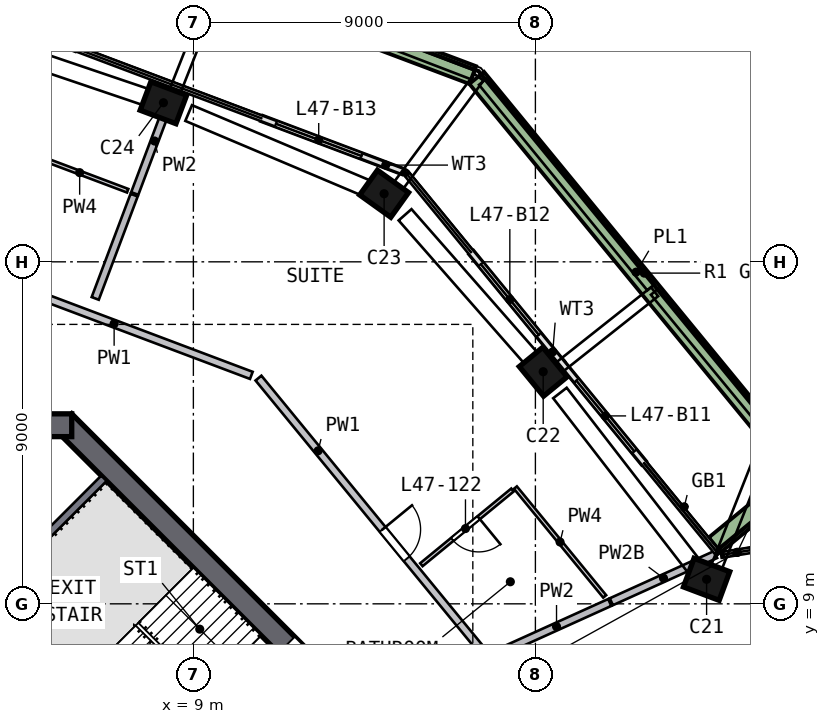
"""IFC4 building model, lengths in metres.
Left out: names, types, materials, properties, quantities, classifications, styles, units other than length and angle.
Written with IfcOpenShell. Run it as: python <this file> out.ifc"""

import sys

from ifc_helpers import new_model, si_unit, direction, frame, frame_2d, origin, origin_2d, place, context, subcontext, project, spatial, rectangle, extrude, element, fill, save


model = new_model("IFC4")
c1 = context("Model", 3, precision=1e-05, world=origin(), true_north=direction((0.0, 1.0)))
c2 = subcontext(c1, "Body", "Model", "MODEL_VIEW")
j1 = project(units=[si_unit("LENGTHUNIT", "METRE"), si_unit("PLANEANGLEUNIT", "RADIAN")], contexts=[c1])
p1 = place(None, origin())
s1 = spatial("IfcSite", under=j1, at=p1, CompositionType="ELEMENT")
p2 = place(p1, origin())
s2 = spatial("IfcBuilding", under=s1, at=p2, CompositionType="ELEMENT")
p3 = place(p2, frame((0.0, 0.0, 194.0)))
s3 = spatial("IfcBuildingStorey", under=s2, at=p3, CompositionType="ELEMENT", Elevation=194.0)
p4 = place(p3, frame((22.561, 9.516, 0.0), z_axis=(-0.046140603, 0.106875927, 0.993201179), x_axis=(0.935152586, -0.344962339, 0.080564417)))
e1 = element("IfcColumn", 1, at=p4, inside=s3, PredefinedType="COLUMN", context=c2, shape_type="SweptSolid", body=[
    extrude(rectangle(XDim=1.0, YDim=0.8, at=origin_2d()), origin(), (0.0, 0.0, 1.0), 3.212),
])
p5 = place(p3, frame((18.292, 15.004, 0.0), z_axis=(-0.072093953, 0.086391066, 0.993649357), x_axis=(-0.630150897, 0.768277159, -0.112516907)))
e2 = element("IfcColumn", 2, at=p5, inside=s3, PredefinedType="COLUMN", context=c2, shape_type="SweptSolid", body=[
    extrude(rectangle(XDim=1.0, YDim=0.8, at=origin_2d()), origin(), (0.0, 0.0, 1.0), 3.21),
])
p6 = place(p3, frame((14.133, 19.712, 0.0), z_axis=(-0.094344854, 0.066444321, 0.993319788), x_axis=(0.807241683, -0.578831594, 0.11539)))
e3 = element("IfcColumn", 3, at=p6, inside=s3, PredefinedType="COLUMN", context=c2, shape_type="SweptSolid", body=[
    extrude(rectangle(XDim=1.0, YDim=0.8, at=origin_2d()), origin(), (0.0, 0.0, 1.0), 3.211),
])
p7 = place(p3, frame((8.339, 22.14, 0.0), z_axis=(-0.105631262, 0.038784697, 0.993648722), x_axis=(-0.929821941, 0.350385276, -0.112522514)))
e4 = element("IfcColumn", 4, at=p7, inside=s3, PredefinedType="COLUMN", context=c2, shape_type="SweptSolid", body=[
    extrude(rectangle(XDim=1.0, YDim=0.8, at=origin_2d()), origin(), (0.0, 0.0, 1.0), 3.21),
])
p8 = place(p3, frame((13.788, 5.587, 0.0), z_axis=(0.0, 0.0, 1.0), x_axis=(-0.707106781, 0.707106781, 0.0)))
e5 = element("IfcWall", 5, at=p8, inside=s3, PredefinedType="SHEAR", context=c2, shape_type="SweptSolid", body=[
    extrude(rectangle(XDim=11.598, YDim=0.6, at=frame_2d((5.799, 0.0))), origin(), (0.0, 0.0, 1.0), 3.5),
])
p9 = place(p8, frame((2.099, 0.0, 0.0)))
e6 = element("IfcOpeningElement", 6, at=p9, cuts=e5, PredefinedType="OPENING", context=c2, shape_type="SweptSolid", body=[
    extrude(rectangle(XDim=1.2, YDim=2.1, at=frame_2d((0.6, 1.05))), frame((0.0, 0.31, 0.0), z_axis=(0.0, -1.0, 0.0), x_axis=(1.0, 0.0, 0.0)), (0.0, 0.0, 1.0), 0.62),
])
p10 = place(p3, frame((5.799, 13.7, 0.0), z_axis=(0.0, 0.0, 1.0), x_axis=(-1.0, 0.0, 0.0)))
e7 = element("IfcWall", 7, at=p10, inside=s3, PredefinedType="SHEAR", context=c2, shape_type="SweptSolid", body=[
    extrude(rectangle(XDim=11.598, YDim=0.6, at=frame_2d((5.799, 0.0))), origin(), (0.0, 0.0, 1.0), 3.5),
])
p11 = place(p10, frame((4.899, 0.0, 0.0)))
e8 = element("IfcOpeningElement", 8, at=p11, cuts=e7, PredefinedType="OPENING", context=c2, shape_type="SweptSolid", body=[
    extrude(rectangle(XDim=1.8, YDim=2.1, at=frame_2d((0.9, 1.05))), frame((0.0, 0.31, 0.0), z_axis=(0.0, -1.0, 0.0), x_axis=(1.0, 0.0, 0.0)), (0.0, 0.0, 1.0), 0.62),
])
p12 = place(p3, frame((20.854, 12.708, 0.0), z_axis=(0.0, 0.0, 1.0), x_axis=(-0.634175757, 0.773188922, 0.0)))
e9 = element("IfcWall", 9, at=p12, inside=s3, PredefinedType="SOLIDWALL", context=c2, shape_type="SweptSolid", body=[
    extrude(rectangle(XDim=3.4, YDim=0.15, at=frame_2d((1.7, 0.0))), origin(), (0.0, 0.0, 1.0), 2.475),
])
p13 = place(p12, frame((0.4, 0.0, 0.0)))
e10 = element("IfcOpeningElement", 10, at=p13, cuts=e9, PredefinedType="OPENING", context=c2, shape_type="SweptSolid", body=[
    extrude(rectangle(XDim=2.4, YDim=2.4, at=frame_2d((1.2, 1.2))), frame((0.0, 0.085, 0.0), z_axis=(0.0, -1.0, 0.0), x_axis=(1.0, 0.0, 0.0)), (0.0, 0.0, 1.0), 0.17),
])
p14 = place(p3, frame((18.698, 15.337, 0.0), z_axis=(0.0, 0.0, 1.0), x_axis=(-0.634234049, 0.773141107, 0.0)))
e11 = element("IfcWall", 11, at=p14, inside=s3, PredefinedType="SOLIDWALL", context=c2, shape_type="SweptSolid", body=[
    extrude(rectangle(XDim=3.761, YDim=0.15, at=frame_2d((1.881, 0.0))), origin(), (0.0, 0.0, 1.0), 2.475),
])
p15 = place(p14, frame((0.961, 0.0, 0.0)))
e12 = element("IfcOpeningElement", 12, at=p15, cuts=e11, PredefinedType="OPENING", context=c2, shape_type="SweptSolid", body=[
    extrude(rectangle(XDim=2.4, YDim=2.4, at=frame_2d((1.2, 1.2))), frame((0.0, 0.085, 0.0), z_axis=(0.0, -1.0, 0.0), x_axis=(1.0, 0.0, 0.0)), (0.0, 0.0, 1.0), 0.17),
])
p16 = place(p3, frame((14.513, 20.375, 0.0), z_axis=(0.0, 0.0, 1.0), x_axis=(-0.935807148, 0.352512386, 0.0)))
e13 = element("IfcWall", 13, at=p16, inside=s3, PredefinedType="SOLIDWALL", context=c2, shape_type="SweptSolid", body=[
    extrude(rectangle(XDim=3.967, YDim=0.15, at=frame_2d((1.983, 0.0))), origin(), (0.0, 0.0, 1.0), 2.475),
])
p17 = place(p16, frame((1.167, 0.0, 0.0)))
e14 = element("IfcOpeningElement", 14, at=p17, cuts=e13, PredefinedType="OPENING", context=c2, shape_type="SweptSolid", body=[
    extrude(rectangle(XDim=2.4, YDim=2.4, at=frame_2d((1.2, 1.2))), frame((0.0, 0.085, 0.0), z_axis=(0.0, -1.0, 0.0), x_axis=(1.0, 0.0, 0.0)), (0.0, 0.0, 1.0), 0.17),
])
p18 = place(p3, frame((22.72, 10.553, 0.0), z_axis=(0.0, 0.0, 1.0), x_axis=(0.773171239, 0.634197315, 0.0)))
e15 = element("IfcWall", 15, at=p18, inside=s3, PredefinedType="SOLIDWALL", context=c2, shape_type="SweptSolid", body=[
    extrude(rectangle(XDim=3.199, YDim=0.5, at=frame_2d((1.6, 0.0))), origin(), (0.0, 0.0, 1.0), 0.7),
])
p19 = place(p3, frame((24.842, 12.616, 0.0), z_axis=(0.0, 0.0, 1.0), x_axis=(-0.634190419, 0.773176896, 0.0)))
e16 = element("IfcWall", 16, at=p19, inside=s3, PredefinedType="SOLIDWALL", context=c2, shape_type="SweptSolid", body=[
    extrude(rectangle(XDim=13.224, YDim=0.5, at=frame_2d((6.612, 0.0))), origin(), (0.0, 0.0, 1.0), 0.7),
])
p20 = place(p3, frame((16.351, 22.916, 0.0), z_axis=(0.0, 0.0, 1.0), x_axis=(-0.93581421, 0.352493637, 0.0)))
e17 = element("IfcWall", 17, at=p20, inside=s3, PredefinedType="SOLIDWALL", context=c2, shape_type="SweptSolid", body=[
    extrude(rectangle(XDim=13.723, YDim=0.5, at=frame_2d((6.862, 0.0))), origin(), (0.0, 0.0, 1.0), 0.7),
])
p21 = place(p3, frame((3.24, 9.629, 0.0), z_axis=(0.0, 0.0, 1.0), x_axis=(0.707106781, -0.707106781, 0.0)))
e18 = element("IfcWall", 18, at=p21, inside=s3, PredefinedType="SOLIDWALL", context=c2, shape_type="SweptSolid", body=[
    extrude(rectangle(XDim=9.036, YDim=0.2, at=frame_2d((4.518, 0.0))), origin(), (0.0, 0.0, 1.0), 3.19),
])
p22 = place(p21, frame((7.018, 0.0, 0.0)))
e19 = element("IfcOpeningElement", 19, at=p22, cuts=e18, PredefinedType="OPENING", context=c2, shape_type="SweptSolid", body=[
    extrude(rectangle(XDim=1.2, YDim=2.1, at=frame_2d((0.6, 1.05))), frame((0.0, 0.11, 0.0), z_axis=(0.0, -1.0, 0.0), x_axis=(1.0, 0.0, 0.0)), (0.0, 0.0, 1.0), 0.22),
])
p23 = place(p3, frame((3.677, 9.334, 0.0), z_axis=(0.0, 0.0, 1.0), x_axis=(0.707077716, 0.707135845, 0.0)))
e20 = element("IfcWall", 20, at=p23, inside=s3, PredefinedType="SOLIDWALL", context=c2, shape_type="SweptSolid", body=[
    extrude(rectangle(XDim=4.2, YDim=0.2, at=frame_2d((2.1, 0.0))), origin(), (0.0, 0.0, 1.0), 3.19),
])
p24 = place(p3, frame((1.994, 18.225, 0.0), z_axis=(0.0, 0.0, 1.0), x_axis=(0.935816375, -0.352487889, 0.0)))
e21 = element("IfcWall", 21, at=p24, inside=s3, PredefinedType="SOLIDWALL", context=c2, shape_type="SweptSolid", body=[
    extrude(rectangle(XDim=9.115, YDim=0.2, at=frame_2d((4.558, 0.0))), origin(), (0.0, 0.0, 1.0), 3.19),
])
p25 = place(p24, frame((0.2, 0.0, 0.0)))
e22 = element("IfcOpeningElement", 22, at=p25, cuts=e21, PredefinedType="OPENING", context=c2, shape_type="SweptSolid", body=[
    extrude(rectangle(XDim=1.0, YDim=2.1, at=frame_2d((0.5, 1.05))), frame((0.0, 0.11, 0.0), z_axis=(0.0, -1.0, 0.0), x_axis=(1.0, 0.0, 0.0)), (0.0, 0.0, 1.0), 0.22),
])
p26 = place(p3, frame((10.713, 14.941, 0.0), z_axis=(0.0, 0.0, 1.0), x_axis=(0.634184883, -0.773181437, 0.0)))
e23 = element("IfcWall", 23, at=p26, inside=s3, PredefinedType="SOLIDWALL", context=c2, shape_type="SweptSolid", body=[
    extrude(rectangle(XDim=9.316, YDim=0.2, at=frame_2d((4.658, 0.0))), origin(), (0.0, 0.0, 1.0), 3.19),
])
p27 = place(p26, frame((5.15, 0.0, 0.0)))
e24 = element("IfcOpeningElement", 24, at=p27, cuts=e23, PredefinedType="OPENING", context=c2, shape_type="SweptSolid", body=[
    extrude(rectangle(XDim=1.0, YDim=2.1, at=frame_2d((0.5, 1.05))), frame((0.0, 0.11, 0.0), z_axis=(0.0, -1.0, 0.0), x_axis=(1.0, 0.0, 0.0)), (0.0, 0.0, 1.0), 0.22),
])
p28 = place(p3, frame((6.417, 17.037, 0.0), z_axis=(0.0, 0.0, 1.0), x_axis=(0.352504699, 0.935810043, 0.0)))
e25 = element("IfcWall", 25, at=p28, inside=s3, PredefinedType="SOLIDWALL", context=c2, shape_type="SweptSolid", body=[
    extrude(rectangle(XDim=2.905, YDim=0.2, at=frame_2d((1.452, 0.0))), origin(), (0.0, 0.0, 1.0), 3.19),
])
p29 = place(p3, frame((7.458, 19.798, 0.0), z_axis=(0.0, 0.0, 1.0), x_axis=(0.352491676, 0.935814949, 0.0)))
e26 = element("IfcWall", 26, at=p29, inside=s3, PredefinedType="SOLIDWALL", context=c2, shape_type="SweptSolid", body=[
    extrude(rectangle(XDim=2.952, YDim=0.2, at=frame_2d((1.476, 0.0))), origin(), (0.0, 0.0, 1.0), 3.19),
])
p30 = place(p3, frame((17.156, 7.768, 0.0), z_axis=(0.0, 0.0, 1.0), x_axis=(0.910950239, 0.412516256, 0.0)))
e27 = element("IfcWall", 27, at=p30, inside=s3, PredefinedType="SOLIDWALL", context=c2, shape_type="SweptSolid", body=[
    extrude(rectangle(XDim=3.074, YDim=0.2, at=frame_2d((1.537, 0.0))), origin(), (0.0, 0.0, 1.0), 3.19),
])
p31 = place(p3, frame((19.998, 9.055, 0.0), z_axis=(0.0, 0.0, 1.0), x_axis=(0.910967975, 0.412477089, 0.0)))
e28 = element("IfcWall", 28, at=p31, inside=s3, PredefinedType="SOLIDWALL", context=c2, shape_type="SweptSolid", body=[
    extrude(rectangle(XDim=3.011, YDim=0.2, at=frame_2d((1.506, 0.0))), origin(), (0.0, 0.0, 1.0), 2.69),
])
p32 = place(p3, frame((4.744, 20.823, 0.0), z_axis=(0.0, 0.0, 1.0), x_axis=(0.935819082, -0.352480702, 0.0)))
e29 = element("IfcWall", 29, at=p32, inside=s3, PredefinedType="PARTITIONING", context=c2, shape_type="SweptSolid", body=[
    extrude(rectangle(XDim=2.7, YDim=0.1, at=frame_2d((1.35, 0.0))), origin(), (0.0, 0.0, 1.0), 3.19),
])
p33 = place(p3, frame((17.397, 11.996, 0.0), z_axis=(0.0, 0.0, 1.0), x_axis=(-0.77318129, -0.634185061, 0.0)))
e30 = element("IfcWall", 30, at=p33, inside=s3, PredefinedType="PARTITIONING", context=c2, shape_type="SweptSolid", body=[
    extrude(rectangle(XDim=3.1, YDim=0.1, at=frame_2d((1.55, 0.0))), origin(), (0.0, 0.0, 1.0), 3.19),
])
p34 = place(p33, frame((1.15, 0.0, 0.0)))
e31 = element("IfcOpeningElement", 31, at=p34, cuts=e30, PredefinedType="OPENING", context=c2, shape_type="SweptSolid", body=[
    extrude(rectangle(XDim=0.9, YDim=2.1, at=frame_2d((0.45, 1.05))), frame((0.0, 0.06, 0.0), z_axis=(0.0, -1.0, 0.0), x_axis=(1.0, 0.0, 0.0)), (0.0, 0.0, 1.0), 0.12),
])
p35 = place(p3, frame((17.474, 12.059, 0.0), z_axis=(0.0, 0.0, 1.0), x_axis=(0.63421358, -0.773157898, 0.0)))
e32 = element("IfcWall", 32, at=p35, inside=s3, PredefinedType="PARTITIONING", context=c2, shape_type="SweptSolid", body=[
    extrude(rectangle(XDim=3.704, YDim=0.1, at=frame_2d((1.852, 0.0))), origin(), (0.0, 0.0, 1.0), 3.19),
])
p36 = place(p13, origin())
e33 = element("IfcDoor", 33, at=p36, inside=s3, OperationType="SLIDING_TO_RIGHT", PredefinedType="DOOR", context=c2, shape_type="SweptSolid", body=[
    extrude(rectangle(XDim=2.4, YDim=2.4, at=frame_2d((1.2, 1.2))), frame((0.0, 0.025, 0.0), z_axis=(0.0, -1.0, 0.0), x_axis=(1.0, 0.0, 0.0)), (0.0, 0.0, 1.0), 0.05),
])
fill(e10, e33)
p37 = place(p15, origin())
e34 = element("IfcDoor", 34, at=p37, inside=s3, OperationType="SLIDING_TO_LEFT", PredefinedType="DOOR", context=c2, shape_type="SweptSolid", body=[
    extrude(rectangle(XDim=2.4, YDim=2.4, at=frame_2d((1.2, 1.2))), frame((0.0, 0.025, 0.0), z_axis=(0.0, -1.0, 0.0), x_axis=(1.0, 0.0, 0.0)), (0.0, 0.0, 1.0), 0.05),
])
fill(e12, e34)
p38 = place(p17, origin())
e35 = element("IfcDoor", 35, at=p38, inside=s3, OperationType="SLIDING_TO_LEFT", PredefinedType="DOOR", context=c2, shape_type="SweptSolid", body=[
    extrude(rectangle(XDim=2.4, YDim=2.4, at=frame_2d((1.2, 1.2))), frame((0.0, 0.025, 0.0), z_axis=(0.0, -1.0, 0.0), x_axis=(1.0, 0.0, 0.0)), (0.0, 0.0, 1.0), 0.05),
])
fill(e14, e35)
p39 = place(p27, origin())
e36 = element("IfcDoor", 36, at=p39, inside=s3, OperationType="SINGLE_SWING_LEFT", PredefinedType="DOOR", context=c2, shape_type="SweptSolid", body=[
    extrude(rectangle(XDim=1.0, YDim=2.1, at=frame_2d((0.5, 1.05))), frame((0.0, 0.025, 0.0), z_axis=(0.0, -1.0, 0.0), x_axis=(1.0, 0.0, 0.0)), (0.0, 0.0, 1.0), 0.05),
])
fill(e24, e36)
p40 = place(p34, origin())
e37 = element("IfcDoor", 37, at=p40, inside=s3, OperationType="SINGLE_SWING_LEFT", PredefinedType="DOOR", context=c2, shape_type="SweptSolid", body=[
    extrude(rectangle(XDim=0.9, YDim=2.1, at=frame_2d((0.45, 1.05))), frame((0.0, 0.025, 0.0), z_axis=(0.0, -1.0, 0.0), x_axis=(1.0, 0.0, 0.0)), (0.0, 0.0, 1.0), 0.05),
])
fill(e31, e37)
save(model, sys.argv[1])
